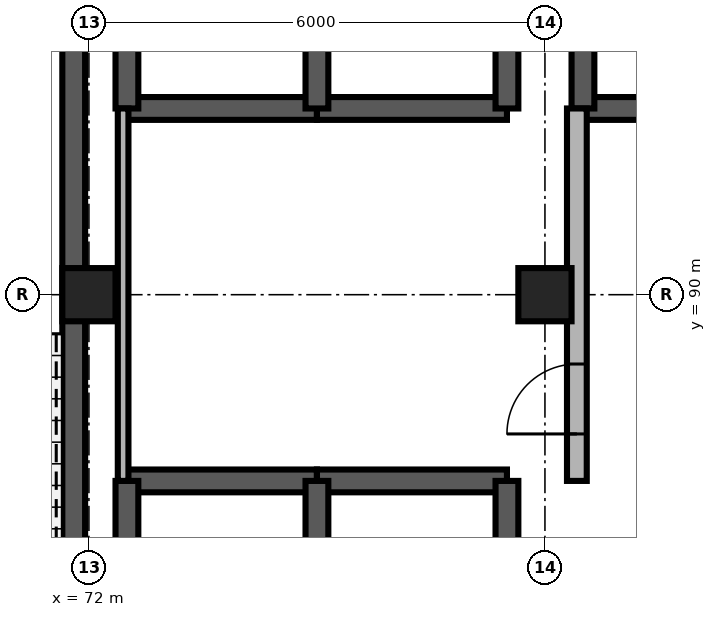
"""IFC4 building model, lengths in metres.
Left out: names, types, materials, properties, quantities, classifications, styles, units other than length and angle.
Written with IfcOpenShell. Run it as: python <this file> out.ifc"""

import sys

from ifc_helpers import new_model, si_unit, direction, frame, frame_2d, origin, origin_2d, place, context, subcontext, project, spatial, rectangle, extrude, element, fill, save


model = new_model("IFC4")
c1 = context("Model", 3, precision=1e-05, world=origin(), true_north=direction((0.0, 1.0)))
c2 = subcontext(c1, "Body", "Model", "MODEL_VIEW")
j1 = project(units=[si_unit("LENGTHUNIT", "METRE"), si_unit("PLANEANGLEUNIT", "RADIAN")], contexts=[c1])
p1 = place(None, origin())
s1 = spatial("IfcSite", under=j1, at=p1, CompositionType="ELEMENT")
p2 = place(p1, origin())
s2 = spatial("IfcBuilding", under=s1, at=p2, CompositionType="ELEMENT")
p3 = place(p2, frame((0.0, 0.0, 63.9)))
s3 = spatial("IfcBuildingStorey", under=s2, at=p3, CompositionType="ELEMENT", Elevation=63.9)
for number, where, z_axis, x_axis in (
    (1, (72.0, 90.0, 0.0), (0.0, 0.0, 1.0), (1.0, 0.0, 0.0)),
    (2, (78.0, 90.0, 0.0), (0.0, 0.0, 1.0), (1.0, 0.0, 0.0)),
):
    element("IfcColumn", number, at=place(p3, frame(where, z_axis=z_axis, x_axis=x_axis)), inside=s3, PredefinedType="COLUMN", context=c2, shape_type="SweptSolid", body=[
        extrude(rectangle(XDim=0.7, YDim=0.7, at=origin_2d()), origin(), (0.0, 0.0, 1.0), 3.9),
    ])
p4 = place(p3, frame((71.8, 84.0, 0.0), z_axis=(0.0, 0.0, 1.0), x_axis=(0.0, 1.0, 0.0)))
e3 = element("IfcWall", 3, at=p4, inside=s3, PredefinedType="SHEAR", context=c2, shape_type="SweptSolid", body=[
    extrude(rectangle(XDim=11.8, YDim=0.3, at=frame_2d((5.9, 0.0))), origin(), (0.0, 0.0, 1.0), 3.66),
])
p5 = place(p3, frame((72.5, 87.55, 0.0), z_axis=(0.0, 0.0, 1.0), x_axis=(1.0, 0.0, 0.0)))
e4 = element("IfcWall", 4, at=p5, inside=s3, PredefinedType="SHEAR", context=c2, shape_type="SweptSolid", body=[
    extrude(rectangle(XDim=2.5, YDim=0.3, at=frame_2d((1.25, 0.0))), origin(), (0.0, 0.0, 1.0), 3.66),
])
p6 = place(p3, frame((72.5, 84.15, 0.0), z_axis=(0.0, 0.0, 1.0), x_axis=(0.0, 1.0, 0.0)))
e5 = element("IfcWall", 5, at=p6, inside=s3, PredefinedType="SHEAR", context=c2, shape_type="SweptSolid", body=[
    extrude(rectangle(XDim=3.4, YDim=0.3, at=frame_2d((1.7, 0.0))), origin(), (0.0, 0.0, 1.0), 3.66),
])
p7 = place(p3, frame((75.0, 87.55, 0.0), z_axis=(0.0, 0.0, 1.0), x_axis=(1.0, 0.0, 0.0)))
e6 = element("IfcWall", 6, at=p7, inside=s3, PredefinedType="SHEAR", context=c2, shape_type="SweptSolid", body=[
    extrude(rectangle(XDim=2.5, YDim=0.3, at=frame_2d((1.25, 0.0))), origin(), (0.0, 0.0, 1.0), 3.66),
])
for number, where, z_axis, x_axis in (
    (7, (75.0, 84.15, 0.0), (0.0, 0.0, 1.0), (0.0, 1.0, 0.0)),
    (8, (77.5, 84.15, 0.0), (0.0, 0.0, 1.0), (0.0, 1.0, 0.0)),
):
    element("IfcWall", number, at=place(p3, frame(where, z_axis=z_axis, x_axis=x_axis)), inside=s3, PredefinedType="SHEAR", context=c2, shape_type="SweptSolid", body=[
        extrude(rectangle(XDim=3.4, YDim=0.3, at=frame_2d((1.7, 0.0))), origin(), (0.0, 0.0, 1.0), 3.66),
    ])
p8 = place(p3, frame((72.5, 92.45, 0.0), z_axis=(0.0, 0.0, 1.0), x_axis=(1.0, 0.0, 0.0)))
e9 = element("IfcWall", 9, at=p8, inside=s3, PredefinedType="SHEAR", context=c2, shape_type="SweptSolid", body=[
    extrude(rectangle(XDim=2.5, YDim=0.3, at=frame_2d((1.25, 0.0))), origin(), (0.0, 0.0, 1.0), 3.66),
])
p9 = place(p3, frame((72.5, 92.45, 0.0), z_axis=(0.0, 0.0, 1.0), x_axis=(0.0, 1.0, 0.0)))
e10 = element("IfcWall", 10, at=p9, inside=s3, PredefinedType="SHEAR", context=c2, shape_type="SweptSolid", body=[
    extrude(rectangle(XDim=3.4, YDim=0.3, at=frame_2d((1.7, 0.0))), origin(), (0.0, 0.0, 1.0), 3.66),
])
p10 = place(p3, frame((75.0, 92.45, 0.0), z_axis=(0.0, 0.0, 1.0), x_axis=(1.0, 0.0, 0.0)))
e11 = element("IfcWall", 11, at=p10, inside=s3, PredefinedType="SHEAR", context=c2, shape_type="SweptSolid", body=[
    extrude(rectangle(XDim=2.5, YDim=0.3, at=frame_2d((1.25, 0.0))), origin(), (0.0, 0.0, 1.0), 3.66),
])
for number, where, z_axis, x_axis in (
    (12, (75.0, 92.45, 0.0), (0.0, 0.0, 1.0), (0.0, 1.0, 0.0)),
    (13, (77.5, 92.45, 0.0), (0.0, 0.0, 1.0), (0.0, 1.0, 0.0)),
):
    element("IfcWall", number, at=place(p3, frame(where, z_axis=z_axis, x_axis=x_axis)), inside=s3, PredefinedType="SHEAR", context=c2, shape_type="SweptSolid", body=[
        extrude(rectangle(XDim=3.4, YDim=0.3, at=frame_2d((1.7, 0.0))), origin(), (0.0, 0.0, 1.0), 3.66),
    ])
p11 = place(p3, frame((78.5, 92.45, 0.0), z_axis=(0.0, 0.0, 1.0), x_axis=(1.0, 0.0, 0.0)))
e14 = element("IfcWall", 14, at=p11, inside=s3, PredefinedType="SHEAR", context=c2, shape_type="SweptSolid", body=[
    extrude(rectangle(XDim=2.5, YDim=0.3, at=frame_2d((1.25, 0.0))), origin(), (0.0, 0.0, 1.0), 3.66),
])
p12 = place(p3, frame((78.5, 92.45, 0.0), z_axis=(0.0, 0.0, 1.0), x_axis=(0.0, 1.0, 0.0)))
e15 = element("IfcWall", 15, at=p12, inside=s3, PredefinedType="SHEAR", context=c2, shape_type="SweptSolid", body=[
    extrude(rectangle(XDim=3.4, YDim=0.3, at=frame_2d((1.7, 0.0))), origin(), (0.0, 0.0, 1.0), 3.66),
])
p13 = place(p3, frame((78.42, 87.55, 0.0), z_axis=(0.0, 0.0, 1.0), x_axis=(0.0, 1.0, 0.0)))
e16 = element("IfcWall", 16, at=p13, inside=s3, PredefinedType="PARTITIONING", context=c2, shape_type="SweptSolid", body=[
    extrude(rectangle(XDim=4.9, YDim=0.26, at=frame_2d((2.45, 0.0))), origin(), (0.0, 0.0, 1.0), 3.66),
])
p14 = place(p13, frame((0.618, 0.0, 0.0)))
e17 = element("IfcOpeningElement", 17, at=p14, cuts=e16, PredefinedType="OPENING", context=c2, shape_type="SweptSolid", body=[
    extrude(rectangle(XDim=0.92, YDim=2.15, at=frame_2d((0.46, 1.075))), frame((0.0, 0.145, 0.0), z_axis=(0.0, -1.0, 0.0), x_axis=(1.0, 0.0, 0.0)), (0.0, 0.0, 1.0), 0.29),
])
p15 = place(p3, frame((72.45, 87.55, 0.0), z_axis=(0.0, 0.0, 1.0), x_axis=(0.0, 1.0, 0.0)))
e18 = element("IfcWall", 18, at=p15, inside=s3, PredefinedType="PARTITIONING", context=c2, shape_type="SweptSolid", body=[
    extrude(rectangle(XDim=4.9, YDim=0.14, at=frame_2d((2.45, 0.0))), origin(), (0.0, 0.0, 1.0), 3.66),
])
p16 = place(p14, origin())
e19 = element("IfcDoor", 19, at=p16, inside=s3, OperationType="SINGLE_SWING_LEFT", PredefinedType="DOOR", context=c2, shape_type="SweptSolid", body=[
    extrude(rectangle(XDim=0.92, YDim=2.15, at=frame_2d((0.46, 1.075))), frame((0.0, 0.025, 0.0), z_axis=(0.0, -1.0, 0.0), x_axis=(1.0, 0.0, 0.0)), (0.0, 0.0, 1.0), 0.05),
])
fill(e17, e19)
save(model, sys.argv[1])
